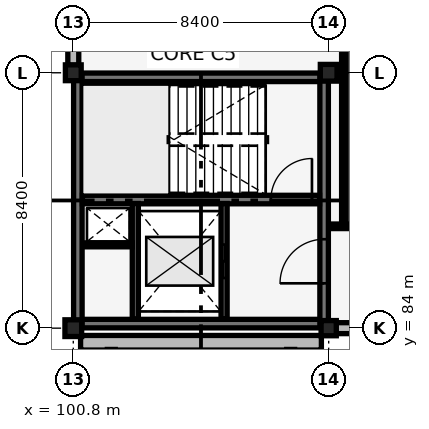
"""IFC4 building model, lengths in metres.
Left out: names, types, materials, properties, quantities, classifications, styles, units other than length and angle.
Written with IfcOpenShell. Run it as: python <this file> out.ifc"""

import sys

from ifc_helpers import new_model, si_unit, direction, frame, frame_2d, origin, origin_2d, place, context, subcontext, project, spatial, rectangle, extrude, element, fill, save


model = new_model("IFC4")
c1 = context("Model", 3, precision=1e-05, world=origin(), true_north=direction((0.0, 1.0)))
c2 = subcontext(c1, "Body", "Model", "MODEL_VIEW")
j1 = project(units=[si_unit("LENGTHUNIT", "METRE"), si_unit("PLANEANGLEUNIT", "RADIAN")], contexts=[c1])
p1 = place(None, origin())
s1 = spatial("IfcSite", under=j1, at=p1, CompositionType="ELEMENT")
p2 = place(p1, origin())
s2 = spatial("IfcBuilding", under=s1, at=p2, CompositionType="ELEMENT")
p3 = place(p2, frame((0.0, 0.0, 13.94)))
s3 = spatial("IfcBuildingStorey", under=s2, at=p3, CompositionType="ELEMENT", Elevation=13.94)
for number, where, z_axis, x_axis in (
    (1, (100.95, 84.15, 0.0), (0.0, 0.0, 1.0), (1.0, 0.0, 0.0)),
    (2, (100.95, 92.25, 0.0), (0.0, 0.0, 1.0), (1.0, 0.0, 0.0)),
    (3, (100.95, 84.15, 0.0), (0.0, 0.0, 1.0), (0.0, 1.0, 0.0)),
):
    element("IfcWall", number, at=place(p3, frame(where, z_axis=z_axis, x_axis=x_axis)), inside=s3, PredefinedType="SHEAR", context=c2, shape_type="SweptSolid", body=[
        extrude(rectangle(XDim=8.1, YDim=0.28, at=frame_2d((4.05, 0.0))), origin(), (0.0, 0.0, 1.0), 3.78),
    ])
p4 = place(p3, frame((109.05, 84.15, 0.0), z_axis=(0.0, 0.0, 1.0), x_axis=(0.0, 1.0, 0.0)))
e4 = element("IfcWall", 4, at=p4, inside=s3, PredefinedType="SHEAR", context=c2, shape_type="SweptSolid", body=[
    extrude(rectangle(XDim=8.1, YDim=0.28, at=frame_2d((4.05, 0.0))), origin(), (0.0, 0.0, 1.0), 3.78),
])
p5 = place(p4, frame((1.325, 0.0, 0.0)))
e5 = element("IfcOpeningElement", 5, at=p5, cuts=e4, PredefinedType="OPENING", context=c2, shape_type="SweptSolid", body=[
    extrude(rectangle(XDim=1.45, YDim=2.15, at=frame_2d((0.725, 1.075))), frame((0.0, 0.15, 0.0), z_axis=(0.0, -1.0, 0.0), x_axis=(1.0, 0.0, 0.0)), (0.0, 0.0, 1.0), 0.3),
])
p6 = place(p3, frame((101.1, 88.23, 0.0), z_axis=(0.0, 0.0, 1.0), x_axis=(1.0, 0.0, 0.0)))
e6 = element("IfcWall", 6, at=p6, inside=s3, PredefinedType="SHEAR", context=c2, shape_type="SweptSolid", body=[
    extrude(rectangle(XDim=7.8, YDim=0.28, at=frame_2d((3.9, 0.0))), origin(), (0.0, 0.0, 1.0), 3.78),
])
p7 = place(p6, frame((6.2, 0.0, 0.0)))
e7 = element("IfcOpeningElement", 7, at=p7, cuts=e6, PredefinedType="OPENING", context=c2, shape_type="SweptSolid", body=[
    extrude(rectangle(XDim=1.35, YDim=2.15, at=frame_2d((0.675, 1.075))), frame((0.0, 0.15, 0.0), z_axis=(0.0, -1.0, 0.0), x_axis=(1.0, 0.0, 0.0)), (0.0, 0.0, 1.0), 0.3),
])
p8 = place(p3, frame((100.8, 84.0, 0.0), z_axis=(0.0, 0.0, 1.0), x_axis=(1.0, 0.0, 0.0)))
e8 = element("IfcColumn", 8, at=p8, inside=s3, PredefinedType="COLUMN", context=c2, shape_type="SweptSolid", body=[
    extrude(rectangle(XDim=0.55, YDim=0.55, at=origin_2d()), origin(), (0.0, 0.0, 1.0), 3.78),
])
p9 = place(p3, frame((100.8, 92.4, 0.0), z_axis=(0.0, 0.0, 1.0), x_axis=(1.0, 0.0, 0.0)))
e9 = element("IfcColumn", 9, at=p9, inside=s3, PredefinedType="COLUMN", context=c2, shape_type="SweptSolid", body=[
    extrude(rectangle(XDim=0.52, YDim=0.52, at=origin_2d()), origin(), (0.0, 0.0, 1.0), 3.78),
])
p10 = place(p3, frame((109.2, 84.0, 0.0), z_axis=(0.0, 0.0, 1.0), x_axis=(1.0, 0.0, 0.0)))
e10 = element("IfcColumn", 10, at=p10, inside=s3, PredefinedType="COLUMN", context=c2, shape_type="SweptSolid", body=[
    extrude(rectangle(XDim=0.5, YDim=0.5, at=origin_2d()), origin(), (0.0, 0.0, 1.0), 3.78),
])
p11 = place(p3, frame((109.2, 92.4, 0.0), z_axis=(0.0, 0.0, 1.0), x_axis=(1.0, 0.0, 0.0)))
e11 = element("IfcColumn", 11, at=p11, inside=s3, PredefinedType="COLUMN", context=c2, shape_type="SweptSolid", body=[
    extrude(rectangle(XDim=0.55, YDim=0.55, at=origin_2d()), origin(), (0.0, 0.0, 1.0), 3.78),
])
p12 = place(p3, frame((101.04, 83.52, 0.0), z_axis=(0.0, 0.0, 1.0), x_axis=(1.0, 0.0, 0.0)))
e12 = element("IfcWall", 12, at=p12, inside=s3, PredefinedType="SOLIDWALL", context=c2, shape_type="SweptSolid", body=[
    extrude(rectangle(XDim=7.92, YDim=0.48, at=frame_2d((3.96, 0.0))), origin(), (0.0, 0.0, 1.0), 4.08),
])
p13 = place(p3, frame((100.8, 92.645, 0.0), z_axis=(0.0, 0.0, 1.0), x_axis=(0.0, 1.0, 0.0)))
e13 = element("IfcWall", 13, at=p13, inside=s3, PredefinedType="SOLIDWALL", context=c2, shape_type="SweptSolid", body=[
    extrude(rectangle(XDim=7.895, YDim=0.36, at=frame_2d((3.948, 0.0))), origin(), (0.0, 0.0, 1.0), 3.15),
])
p14 = place(p3, frame((109.435, 84.0, 0.0), z_axis=(0.0, 0.0, 1.0), x_axis=(1.0, 0.0, 0.0)))
e14 = element("IfcWall", 14, at=p14, inside=s3, PredefinedType="SOLIDWALL", context=c2, shape_type="SweptSolid", body=[
    extrude(rectangle(XDim=7.905, YDim=0.36, at=frame_2d((3.953, 0.0))), origin(), (0.0, 0.0, 1.0), 3.15),
])
p15 = place(p14, frame((1.127, 0.0, 0.7)))
e15 = element("IfcOpeningElement", 15, at=p15, cuts=e14, PredefinedType="OPENING", context=c2, shape_type="SweptSolid", body=[
    extrude(rectangle(XDim=0.75, YDim=2.1, at=frame_2d((0.375, 1.05))), frame((0.0, 0.19, 0.0), z_axis=(0.0, -1.0, 0.0), x_axis=(1.0, 0.0, 0.0)), (0.0, 0.0, 1.0), 0.38),
])
p16 = place(p14, frame((2.708, 0.0, 0.7)))
e16 = element("IfcOpeningElement", 16, at=p16, cuts=e14, PredefinedType="OPENING", context=c2, shape_type="SweptSolid", body=[
    extrude(rectangle(XDim=0.75, YDim=2.1, at=frame_2d((0.375, 1.05))), frame((0.0, 0.19, 0.0), z_axis=(0.0, -1.0, 0.0), x_axis=(1.0, 0.0, 0.0)), (0.0, 0.0, 1.0), 0.38),
])
p17 = place(p14, frame((4.447, 0.0, 0.7)))
e17 = element("IfcOpeningElement", 17, at=p17, cuts=e14, PredefinedType="OPENING", context=c2, shape_type="SweptSolid", body=[
    extrude(rectangle(XDim=0.75, YDim=2.1, at=frame_2d((0.375, 1.05))), frame((0.0, 0.19, 0.0), z_axis=(0.0, -1.0, 0.0), x_axis=(1.0, 0.0, 0.0)), (0.0, 0.0, 1.0), 0.38),
])
p18 = place(p14, frame((6.028, 0.0, 0.7)))
e18 = element("IfcOpeningElement", 18, at=p18, cuts=e14, PredefinedType="OPENING", context=c2, shape_type="SweptSolid", body=[
    extrude(rectangle(XDim=0.75, YDim=2.1, at=frame_2d((0.375, 1.05))), frame((0.0, 0.19, 0.0), z_axis=(0.0, -1.0, 0.0), x_axis=(1.0, 0.0, 0.0)), (0.0, 0.0, 1.0), 0.38),
])
p19 = place(p3, frame((105.76, 84.3, 0.0), z_axis=(0.0, 0.0, 1.0), x_axis=(0.0, 1.0, 0.0)))
e19 = element("IfcWall", 19, at=p19, inside=s3, PredefinedType="SHEAR", context=c2, shape_type="SweptSolid", body=[
    extrude(rectangle(XDim=3.8, YDim=0.2, at=frame_2d((1.9, 0.0))), origin(), (0.0, 0.0, 1.0), 3.78),
])
p20 = place(p19, frame((1.35, 0.0, 0.0)))
e20 = element("IfcOpeningElement", 20, at=p20, cuts=e19, PredefinedType="OPENING", context=c2, shape_type="SweptSolid", body=[
    extrude(rectangle(XDim=1.1, YDim=2.15, at=frame_2d((0.55, 1.075))), frame((0.0, 0.11, 0.0), z_axis=(0.0, -1.0, 0.0), x_axis=(1.0, 0.0, 0.0)), (0.0, 0.0, 1.0), 0.22),
])
p21 = place(p3, frame((102.84, 84.3, 0.0), z_axis=(0.0, 0.0, 1.0), x_axis=(0.0, 1.0, 0.0)))
e21 = element("IfcWall", 21, at=p21, inside=s3, PredefinedType="SHEAR", context=c2, shape_type="SweptSolid", body=[
    extrude(rectangle(XDim=3.8, YDim=0.2, at=frame_2d((1.9, 0.0))), origin(), (0.0, 0.0, 1.0), 3.78),
])
p22 = place(p3, frame((101.12, 86.74, 0.0), z_axis=(0.0, 0.0, 1.0), x_axis=(1.0, 0.0, 0.0)))
e22 = element("IfcWall", 22, at=p22, inside=s3, PredefinedType="PARTITIONING", context=c2, shape_type="SweptSolid", body=[
    extrude(rectangle(XDim=1.62, YDim=0.13, at=frame_2d((0.81, 0.0))), origin(), (0.0, 0.0, 1.0), 3.78),
])
p23 = place(p3, frame((109.23, 87.35, 0.0), z_axis=(0.0, 0.0, 1.0), x_axis=(1.0, 0.0, 0.0)))
e23 = element("IfcWall", 23, at=p23, inside=s3, PredefinedType="PARTITIONING", context=c2, shape_type="SweptSolid", body=[
    extrude(rectangle(XDim=16.74, YDim=0.15, at=frame_2d((8.37, 0.0))), origin(), (0.0, 0.0, 1.0), 3.1),
])
p24 = place(p23, frame((7.845, 0.0, 0.0)))
e24 = element("IfcOpeningElement", 24, at=p24, cuts=e23, PredefinedType="OPENING", context=c2, shape_type="SweptSolid", body=[
    extrude(rectangle(XDim=1.05, YDim=2.15, at=frame_2d((0.525, 1.075))), frame((0.0, 0.085, 0.0), z_axis=(0.0, -1.0, 0.0), x_axis=(1.0, 0.0, 0.0)), (0.0, 0.0, 1.0), 0.17),
])
p25 = place(p3, frame((109.7, 87.5, 0.0), z_axis=(0.0, 0.0, 1.0), x_axis=(0.0, 1.0, 0.0)))
e25 = element("IfcWall", 25, at=p25, inside=s3, PredefinedType="PARTITIONING", context=c2, shape_type="SweptSolid", body=[
    extrude(rectangle(XDim=29.92, YDim=0.15, at=frame_2d((14.96, 0.0))), origin(), (0.0, 0.0, 1.0), 3.05),
])
p26 = place(p7, origin())
e26 = element("IfcDoor", 26, at=p26, inside=s3, OperationType="SINGLE_SWING_RIGHT", PredefinedType="DOOR", context=c2, shape_type="SweptSolid", body=[
    extrude(rectangle(XDim=1.35, YDim=2.15, at=frame_2d((0.675, 1.075))), frame((0.0, 0.025, 0.0), z_axis=(0.0, -1.0, 0.0), x_axis=(1.0, 0.0, 0.0)), (0.0, 0.0, 1.0), 0.05),
])
fill(e7, e26)
p27 = place(p20, origin())
e27 = element("IfcDoor", 27, at=p27, inside=s3, OperationType="SLIDING_TO_LEFT", PredefinedType="DOOR", context=c2, shape_type="SweptSolid", body=[
    extrude(rectangle(XDim=1.1, YDim=2.15, at=frame_2d((0.55, 1.075))), frame((0.0, 0.025, 0.0), z_axis=(0.0, -1.0, 0.0), x_axis=(1.0, 0.0, 0.0)), (0.0, 0.0, 1.0), 0.05),
])
fill(e20, e27)
p28 = place(p5, origin())
e28 = element("IfcDoor", 28, at=p28, inside=s3, OperationType="DOUBLE_DOOR_SINGLE_SWING", PredefinedType="DOOR", context=c2, shape_type="SweptSolid", body=[
    extrude(rectangle(XDim=1.45, YDim=2.15, at=frame_2d((0.725, 1.075))), frame((0.0, 0.025, 0.0), z_axis=(0.0, -1.0, 0.0), x_axis=(1.0, 0.0, 0.0)), (0.0, 0.0, 1.0), 0.05),
])
fill(e5, e28)
save(model, sys.argv[1])
